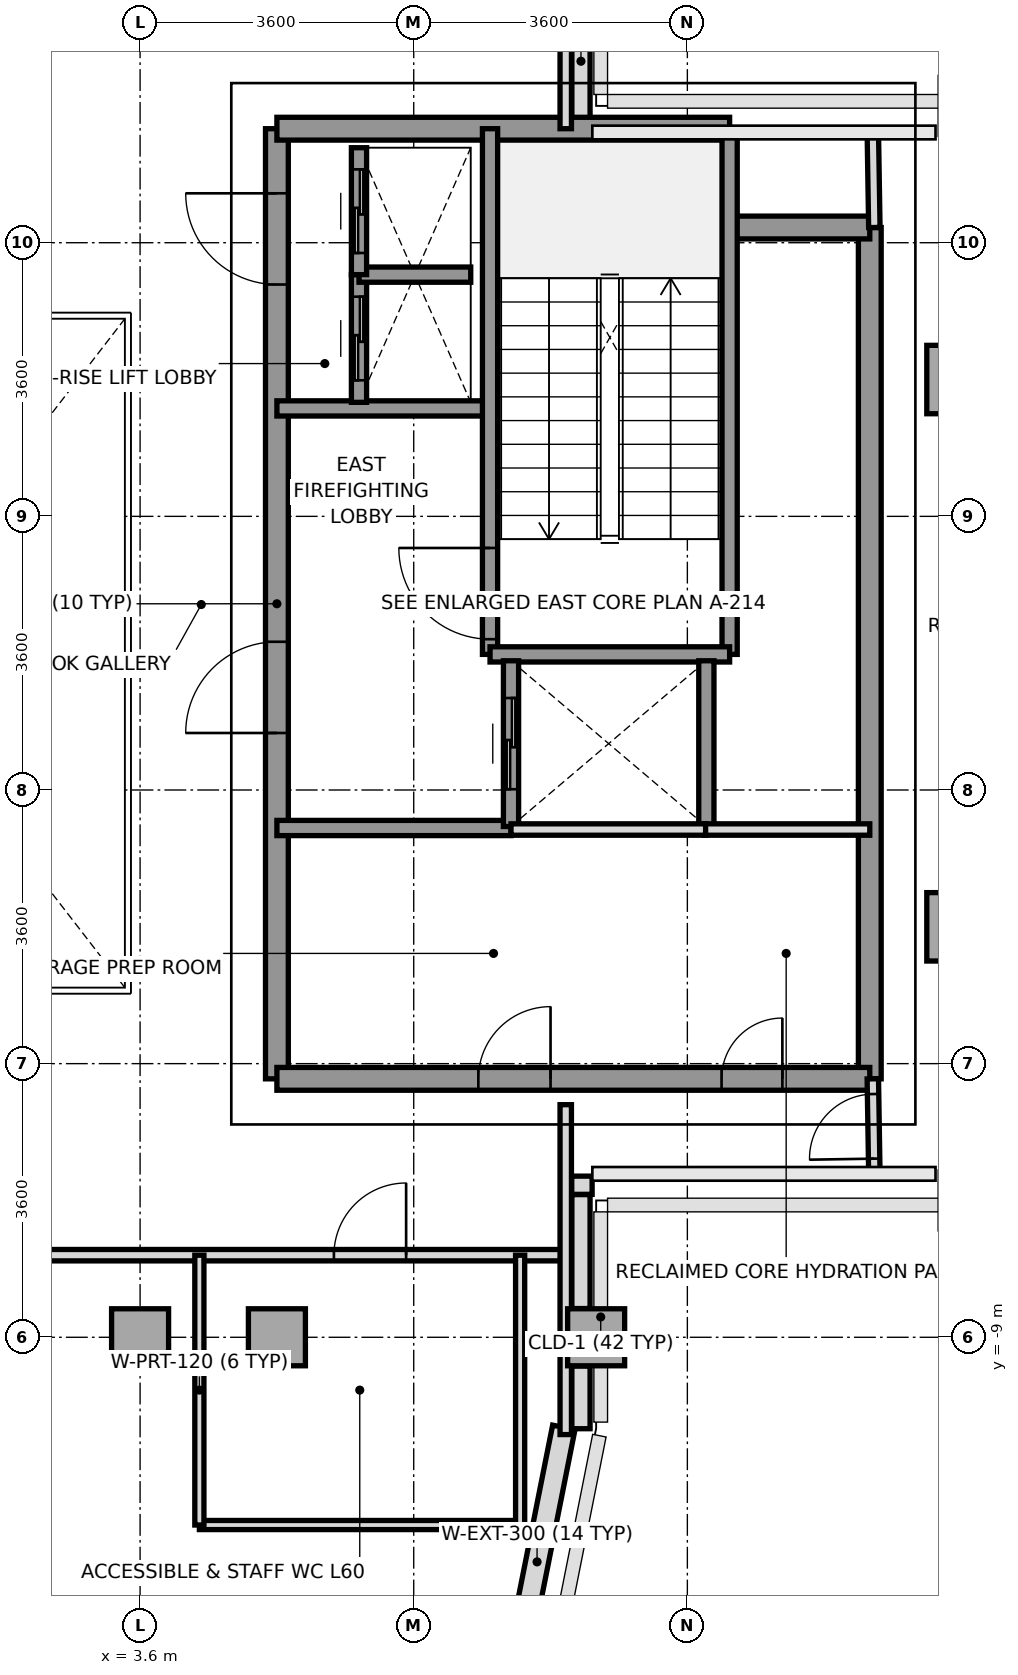
"""IFC4 building model, lengths in metres.
Left out: names, types, materials, properties, quantities, classifications, styles, units other than length and angle.
Written with IfcOpenShell. Run it as: python <this file> out.ifc"""

import sys

from ifc_helpers import new_model, si_unit, direction, frame, frame_2d, origin, origin_2d, place, context, subcontext, project, spatial, rectangle, extrude, source, transform, mapped, element, fill, save


model = new_model("IFC4")
c1 = context("Model", 3, precision=1e-05, world=origin(), true_north=direction((0.0, 1.0)))
c2 = subcontext(c1, "Body", "Model", "MODEL_VIEW")
j1 = project(units=[si_unit("LENGTHUNIT", "METRE"), si_unit("PLANEANGLEUNIT", "RADIAN")], contexts=[c1])
p1 = place(None, origin())
s1 = spatial("IfcSite", under=j1, at=p1, CompositionType="ELEMENT")
p2 = place(p1, origin())
s2 = spatial("IfcBuilding", under=s1, at=p2, CompositionType="ELEMENT")
p3 = place(p2, frame((0.0, 0.0, 219.4)))
s3 = spatial("IfcBuildingStorey", under=s2, at=p3, CompositionType="ELEMENT", Elevation=219.4)
m1 = source(origin(), c2, "Body", "SweptSolid", [
    extrude(rectangle(XDim=0.75, YDim=0.75, at=origin_2d()), origin(), (0.0, 0.0, 1.0), 4.01),
])
for number, where, z_axis, x_axis in (
    (1, (3.6, -9.0, 0.0), (0.0, 0.0, 1.0), (1.0, 0.0, 0.0)),
    (2, (5.4, -9.0, 0.0), (0.0, 0.0, 1.0), (1.0, 0.0, 0.0)),
    (3, (9.6, -9.0, 0.0), (0.0, 0.0, 1.0), (1.0, 0.0, 0.0)),
):
    element("IfcColumn", number, at=place(p3, frame(where, z_axis=z_axis, x_axis=x_axis)), inside=s3, PredefinedType="COLUMN", context=c2, shape_type="MappedRepresentation", body=[
        mapped(m1, transform((0.0, 0.0, 0.0), x_axis=(1.0, 0.0, 0.0), y_axis=(0.0, 1.0, 0.0), z_axis=(0.0, 0.0, 1.0), scale=1.0)),
    ])
m2 = source(origin(), c2, "Body", "SweptSolid", [
    extrude(rectangle(XDim=0.9, YDim=0.9, at=origin_2d()), origin(), (0.0, 0.0, 1.0), 4.01),
])
for number, where, z_axis, x_axis in (
    (4, (14.4, -3.6, 0.0), (0.0, 0.0, 1.0), (1.0, 0.0, 0.0)),
    (5, (14.4, 3.6, 0.0), (0.0, 0.0, 1.0), (1.0, 0.0, 0.0)),
):
    element("IfcColumn", number, at=place(p3, frame(where, z_axis=z_axis, x_axis=x_axis)), inside=s3, PredefinedType="COLUMN", context=c2, shape_type="MappedRepresentation", body=[
        mapped(m2, transform((0.0, 0.0, 0.0), x_axis=(1.0, 0.0, 0.0), y_axis=(0.0, 1.0, 0.0), z_axis=(0.0, 0.0, 1.0), scale=1.0)),
    ])
p4 = place(p3, frame((8.471, -13.725, 0.0), z_axis=(0.0, 0.0, 1.0), x_axis=(0.195114232679, 0.980780523974, 0.0)))
e6 = element("IfcWall", 6, at=p4, inside=s3, PredefinedType="SOLIDWALL", context=c2, shape_type="SweptSolid", body=[
    extrude(rectangle(XDim=3.609, YDim=0.3, at=frame_2d((1.804, 0.0))), origin(), (0.0, 0.0, 1.0), 4.01),
])
p5 = place(p3, frame((9.547, -7.0, 0.0), z_axis=(0.0, 0.0, 1.0), x_axis=(-1.0, 0.0, 0.0)))
e7 = element("IfcWall", 7, at=p5, inside=s3, PredefinedType="PARAPET", context=c2, shape_type="SweptSolid", body=[
    extrude(rectangle(XDim=0.269, YDim=0.24, at=frame_2d((0.135, 0.0))), origin(), (0.0, 0.0, 1.0), 1.15),
])
p6 = place(p3, frame((9.4, -7.123, 0.0), z_axis=(0.0, 0.0, 1.0), x_axis=(0.0, -1.0, 0.0)))
e8 = element("IfcWall", 8, at=p6, inside=s3, PredefinedType="PARAPET", context=c2, shape_type="SweptSolid", body=[
    extrude(rectangle(XDim=1.499, YDim=0.24, at=frame_2d((0.75, 0.0))), origin(), (0.0, 0.0, 1.0), 1.15),
])
p7 = place(p3, frame((9.4, -9.378, 0.0), z_axis=(0.0, 0.0, 1.0), x_axis=(0.0, -1.0, 0.0)))
e9 = element("IfcWall", 9, at=p7, inside=s3, PredefinedType="PARAPET", context=c2, shape_type="SweptSolid", body=[
    extrude(rectangle(XDim=0.825, YDim=0.24, at=frame_2d((0.413, 0.0))), origin(), (0.0, 0.0, 1.0), 1.15),
])
p8 = place(p3, frame((9.4, 8.622, 0.0), z_axis=(0.0, 0.0, 1.0), x_axis=(0.0, -1.0, 0.0)))
e10 = element("IfcWall", 10, at=p8, inside=s3, PredefinedType="PARAPET", context=c2, shape_type="SweptSolid", body=[
    extrude(rectangle(XDim=1.669, YDim=0.24, at=frame_2d((0.834, 0.0))), origin(), (0.0, 0.0, 1.0), 1.15),
])
p9 = place(p3, frame((13.2, -5.6, 0.0), z_axis=(0.0, 0.0, 1.0), x_axis=(0.0, 1.0, 0.0)))
e11 = element("IfcWall", 11, at=p9, inside=s3, PredefinedType="SHEAR", context=c2, shape_type="SweptSolid", body=[
    extrude(rectangle(XDim=11.2, YDim=0.3, at=frame_2d((5.6, 0.0))), origin(), (0.0, 0.0, 1.0), 4.01),
])
p10 = place(p3, frame((5.4, -5.6, 0.0), z_axis=(0.0, 0.0, 1.0), x_axis=(0.0, 1.0, 0.0)))
e12 = element("IfcWall", 12, at=p10, inside=s3, PredefinedType="SHEAR", context=c2, shape_type="SweptSolid", body=[
    extrude(rectangle(XDim=12.5, YDim=0.3, at=frame_2d((6.25, 0.0))), origin(), (0.0, 0.0, 1.0), 4.01),
])
p11 = place(p10, frame((4.55, 0.0, 0.0)))
e13 = element("IfcOpeningElement", 13, at=p11, cuts=e12, PredefinedType="OPENING", context=c2, shape_type="SweptSolid", body=[
    extrude(rectangle(XDim=1.2, YDim=2.2, at=frame_2d((0.6, 1.1))), frame((0.0, 0.16, 0.0), z_axis=(0.0, -1.0, 0.0), x_axis=(1.0, 0.0, 0.0)), (0.0, 0.0, 1.0), 0.32),
])
p12 = place(p10, frame((10.45, 0.0, 0.0)))
e14 = element("IfcOpeningElement", 14, at=p12, cuts=e12, PredefinedType="OPENING", context=c2, shape_type="SweptSolid", body=[
    extrude(rectangle(XDim=1.2, YDim=2.2, at=frame_2d((0.6, 1.1))), frame((0.0, 0.16, 0.0), z_axis=(0.0, -1.0, 0.0), x_axis=(1.0, 0.0, 0.0)), (0.0, 0.0, 1.0), 0.32),
])
p13 = place(p3, frame((5.4, 6.9, 0.0), z_axis=(0.0, 0.0, 1.0), x_axis=(1.0, 0.0, 0.0)))
e15 = element("IfcWall", 15, at=p13, inside=s3, PredefinedType="SHEAR", context=c2, shape_type="SweptSolid", body=[
    extrude(rectangle(XDim=5.956, YDim=0.3, at=frame_2d((2.978, 0.0))), origin(), (0.0, 0.0, 1.0), 4.01),
])
p14 = place(p3, frame((11.356, 5.6, 0.0), z_axis=(0.0, 0.0, 1.0), x_axis=(1.0, 0.0, 0.0)))
e16 = element("IfcWall", 16, at=p14, inside=s3, PredefinedType="SHEAR", context=c2, shape_type="SweptSolid", body=[
    extrude(rectangle(XDim=1.844, YDim=0.3, at=frame_2d((0.922, 0.0))), origin(), (0.0, 0.0, 1.0), 4.01),
])
p15 = place(p3, frame((5.4, -5.6, 0.0), z_axis=(0.0, 0.0, 1.0), x_axis=(1.0, 0.0, 0.0)))
e17 = element("IfcWall", 17, at=p15, inside=s3, PredefinedType="SHEAR", context=c2, shape_type="SweptSolid", body=[
    extrude(rectangle(XDim=7.8, YDim=0.3, at=frame_2d((3.9, 0.0))), origin(), (0.0, 0.0, 1.0), 4.01),
])
p16 = place(p15, frame((5.85, 0.0, 0.0)))
e18 = element("IfcOpeningElement", 18, at=p16, cuts=e17, PredefinedType="OPENING", context=c2, shape_type="SweptSolid", body=[
    extrude(rectangle(XDim=0.8, YDim=2.1, at=frame_2d((0.4, 1.05))), frame((0.0, 0.16, 0.0), z_axis=(0.0, -1.0, 0.0), x_axis=(1.0, 0.0, 0.0)), (0.0, 0.0, 1.0), 0.32),
])
p17 = place(p15, frame((2.65, 0.0, 0.0)))
e19 = element("IfcOpeningElement", 19, at=p17, cuts=e17, PredefinedType="OPENING", context=c2, shape_type="SweptSolid", body=[
    extrude(rectangle(XDim=0.95, YDim=2.15, at=frame_2d((0.475, 1.075))), frame((0.0, 0.16, 0.0), z_axis=(0.0, -1.0, 0.0), x_axis=(1.0, 0.0, 0.0)), (0.0, 0.0, 1.0), 0.32),
])
p18 = place(p3, frame((5.4, 3.22, 0.0), z_axis=(0.0, 0.0, 1.0), x_axis=(1.0, 0.0, 0.0)))
e20 = element("IfcWall", 20, at=p18, inside=s3, PredefinedType="SOLIDWALL", context=c2, shape_type="SweptSolid", body=[
    extrude(rectangle(XDim=2.78, YDim=0.2, at=frame_2d((1.39, 0.0))), origin(), (0.0, 0.0, 1.0), 4.01),
])
p19 = place(p3, frame((5.4, -2.3, 0.0), z_axis=(0.0, 0.0, 1.0), x_axis=(1.0, 0.0, 0.0)))
e21 = element("IfcWall", 21, at=p19, inside=s3, PredefinedType="SOLIDWALL", context=c2, shape_type="SweptSolid", body=[
    extrude(rectangle(XDim=3.08, YDim=0.2, at=frame_2d((1.54, 0.0))), origin(), (0.0, 0.0, 1.0), 4.01),
])
p20 = place(p3, frame((8.204, -0.016, 0.0), z_axis=(0.0, 0.0, 1.0), x_axis=(0.0, 1.0, 0.0)))
e22 = element("IfcWall", 22, at=p20, inside=s3, PredefinedType="SOLIDWALL", context=c2, shape_type="SweptSolid", body=[
    extrude(rectangle(XDim=6.916, YDim=0.2, at=frame_2d((3.458, 0.0))), origin(), (0.0, 0.0, 1.0), 4.01),
])
p21 = place(p20, frame((0.2, 0.0, 0.0)))
e23 = element("IfcOpeningElement", 23, at=p21, cuts=e22, PredefinedType="OPENING", context=c2, shape_type="SweptSolid", body=[
    extrude(rectangle(XDim=1.2, YDim=2.2, at=frame_2d((0.6, 1.1))), frame((0.0, 0.11, 0.0), z_axis=(0.0, -1.0, 0.0), x_axis=(1.0, 0.0, 0.0)), (0.0, 0.0, 1.0), 0.22),
])
p22 = place(p3, frame((11.356, -0.016, 0.0), z_axis=(0.0, 0.0, 1.0), x_axis=(0.0, 1.0, 0.0)))
e24 = element("IfcWall", 24, at=p22, inside=s3, PredefinedType="SOLIDWALL", context=c2, shape_type="SweptSolid", body=[
    extrude(rectangle(XDim=6.916, YDim=0.2, at=frame_2d((3.458, 0.0))), origin(), (0.0, 0.0, 1.0), 4.01),
])
p23 = place(p3, frame((8.204, -0.016, 0.0), z_axis=(0.0, 0.0, 1.0), x_axis=(1.0, 0.0, 0.0)))
e25 = element("IfcWall", 25, at=p23, inside=s3, PredefinedType="SOLIDWALL", context=c2, shape_type="SweptSolid", body=[
    extrude(rectangle(XDim=3.152, YDim=0.2, at=frame_2d((1.576, 0.0))), origin(), (0.0, 0.0, 1.0), 4.01),
])
p24 = place(p3, frame((8.48, -2.28, 0.0), z_axis=(0.0, 0.0, 1.0), x_axis=(0.0, 1.0, 0.0)))
e26 = element("IfcWall", 26, at=p24, inside=s3, PredefinedType="SOLIDWALL", context=c2, shape_type="SweptSolid", body=[
    extrude(rectangle(XDim=2.18, YDim=0.2, at=frame_2d((1.09, 0.0))), origin(), (0.0, 0.0, 1.0), 4.01),
])
p25 = place(p24, frame((0.49, 0.0, 0.0)))
e27 = element("IfcOpeningElement", 27, at=p25, cuts=e26, PredefinedType="OPENING", context=c2, shape_type="SweptSolid", body=[
    extrude(rectangle(XDim=1.2, YDim=2.2, at=frame_2d((0.6, 1.1))), frame((0.0, 0.11, 0.0), z_axis=(0.0, -1.0, 0.0), x_axis=(1.0, 0.0, 0.0)), (0.0, 0.0, 1.0), 0.22),
])
p26 = place(p3, frame((11.05, -2.28, 0.0), z_axis=(0.0, 0.0, 1.0), x_axis=(0.0, 1.0, 0.0)))
e28 = element("IfcWall", 28, at=p26, inside=s3, PredefinedType="SOLIDWALL", context=c2, shape_type="SweptSolid", body=[
    extrude(rectangle(XDim=2.18, YDim=0.2, at=frame_2d((1.09, 0.0))), origin(), (0.0, 0.0, 1.0), 4.01),
])
p27 = place(p3, frame((6.48, 3.3, 0.0), z_axis=(0.0, 0.0, 1.0), x_axis=(0.0, 1.0, 0.0)))
e29 = element("IfcWall", 29, at=p27, inside=s3, PredefinedType="SOLIDWALL", context=c2, shape_type="SweptSolid", body=[
    extrude(rectangle(XDim=1.68, YDim=0.2, at=frame_2d((0.84, 0.0))), origin(), (0.0, 0.0, 1.0), 4.01),
])
p28 = place(p27, frame((0.29, 0.0, 0.0)))
e30 = element("IfcOpeningElement", 30, at=p28, cuts=e29, PredefinedType="OPENING", context=c2, shape_type="SweptSolid", body=[
    extrude(rectangle(XDim=1.1, YDim=2.2, at=frame_2d((0.55, 1.1))), frame((0.0, 0.11, 0.0), z_axis=(0.0, -1.0, 0.0), x_axis=(1.0, 0.0, 0.0)), (0.0, 0.0, 1.0), 0.22),
])
p29 = place(p3, frame((6.48, 4.98, 0.0), z_axis=(0.0, 0.0, 1.0), x_axis=(1.0, 0.0, 0.0)))
e31 = element("IfcWall", 31, at=p29, inside=s3, PredefinedType="SOLIDWALL", context=c2, shape_type="SweptSolid", body=[
    extrude(rectangle(XDim=1.47, YDim=0.2, at=frame_2d((0.735, 0.0))), origin(), (0.0, 0.0, 1.0), 4.01),
])
p30 = place(p3, frame((6.48, 4.98, 0.0), z_axis=(0.0, 0.0, 1.0), x_axis=(0.0, 1.0, 0.0)))
e32 = element("IfcWall", 32, at=p30, inside=s3, PredefinedType="SOLIDWALL", context=c2, shape_type="SweptSolid", body=[
    extrude(rectangle(XDim=1.67, YDim=0.2, at=frame_2d((0.835, 0.0))), origin(), (0.0, 0.0, 1.0), 4.01),
])
p31 = place(p30, frame((0.285, 0.0, 0.0)))
e33 = element("IfcOpeningElement", 33, at=p31, cuts=e32, PredefinedType="OPENING", context=c2, shape_type="SweptSolid", body=[
    extrude(rectangle(XDim=1.1, YDim=2.2, at=frame_2d((0.55, 1.1))), frame((0.0, 0.11, 0.0), z_axis=(0.0, -1.0, 0.0), x_axis=(1.0, 0.0, 0.0)), (0.0, 0.0, 1.0), 0.22),
])
p32 = place(p3, frame((11.02, -2.32, 0.0), z_axis=(0.0, 0.0, 1.0), x_axis=(1.0, 0.0, 0.0)))
e34 = element("IfcWall", 34, at=p32, inside=s3, PredefinedType="PARTITIONING", context=c2, shape_type="SweptSolid", body=[
    extrude(rectangle(XDim=2.18, YDim=0.15, at=frame_2d((1.09, 0.0))), origin(), (0.0, 0.0, 1.0), 4.01),
])
p33 = place(p3, frame((8.48, -2.32, 0.0), z_axis=(0.0, 0.0, 1.0), x_axis=(1.0, 0.0, 0.0)))
e35 = element("IfcWall", 35, at=p33, inside=s3, PredefinedType="PARTITIONING", context=c2, shape_type="SweptSolid", body=[
    extrude(rectangle(XDim=2.56, YDim=0.15, at=frame_2d((1.28, 0.0))), origin(), (0.0, 0.0, 1.0), 4.01),
])
p34 = place(p3, frame((9.2, 6.9, 0.0), z_axis=(0.0, 0.0, 1.0), x_axis=(0.0, 1.0, 0.0)))
e36 = element("IfcWall", 36, at=p34, inside=s3, PredefinedType="PARTITIONING", context=c2, shape_type="SweptSolid", body=[
    extrude(rectangle(XDim=3.38, YDim=0.15, at=frame_2d((1.69, 0.0))), origin(), (0.0, 0.0, 1.0), 3.61),
])
p35 = place(p3, frame((-9.2, -7.92, 0.0), z_axis=(0.0, 0.0, 1.0), x_axis=(1.0, 0.0, 0.0)))
e37 = element("IfcWall", 37, at=p35, inside=s3, PredefinedType="PARTITIONING", context=c2, shape_type="SweptSolid", body=[
    extrude(rectangle(XDim=18.4, YDim=0.15, at=frame_2d((9.2, 0.0))), origin(), (0.0, 0.0, 1.0), 3.57),
])
p36 = place(p35, frame((15.35, 0.0, 0.0)))
e38 = element("IfcOpeningElement", 38, at=p36, cuts=e37, PredefinedType="OPENING", context=c2, shape_type="SweptSolid", body=[
    extrude(rectangle(XDim=0.95, YDim=2.15, at=frame_2d((0.475, 1.075))), frame((0.0, 0.085, 0.0), z_axis=(0.0, -1.0, 0.0), x_axis=(1.0, 0.0, 0.0)), (0.0, 0.0, 1.0), 0.17),
])
p37 = place(p35, frame((6.7, 0.0, 0.0)))
e39 = element("IfcOpeningElement", 39, at=p37, cuts=e37, PredefinedType="OPENING", context=c2, shape_type="SweptSolid", body=[
    extrude(rectangle(XDim=1.1, YDim=2.2, at=frame_2d((0.55, 1.1))), frame((0.0, 0.085, 0.0), z_axis=(0.0, -1.0, 0.0), x_axis=(1.0, 0.0, 0.0)), (0.0, 0.0, 1.0), 0.17),
])
p38 = place(p3, frame((9.2, -10.28, 0.0), z_axis=(0.0, 0.0, 1.0), x_axis=(0.0, 1.0, 0.0)))
e40 = element("IfcWall", 40, at=p38, inside=s3, PredefinedType="PARTITIONING", context=c2, shape_type="SweptSolid", body=[
    extrude(rectangle(XDim=4.34, YDim=0.15, at=frame_2d((2.17, 0.0))), origin(), (0.0, 0.0, 1.0), 3.61),
])
p39 = place(p3, frame((4.38, -11.47, 0.0), z_axis=(0.0, 0.0, 1.0), x_axis=(1.0, 0.0, 0.0)))
e41 = element("IfcWall", 41, at=p39, inside=s3, PredefinedType="PARTITIONING", context=c2, shape_type="SweptSolid", body=[
    extrude(rectangle(XDim=4.22, YDim=0.12, at=frame_2d((2.11, 0.0))), origin(), (0.0, 0.0, 1.0), 4.01),
])
for number, where, z_axis, x_axis in (
    (42, (4.38, -11.47, 0.0), (0.0, 0.0, 1.0), (0.0, 1.0, 0.0)),
    (43, (8.6, -11.47, 0.0), (0.0, 0.0, 1.0), (0.0, 1.0, 0.0)),
):
    element("IfcWall", number, at=place(p3, frame(where, z_axis=z_axis, x_axis=x_axis)), inside=s3, PredefinedType="PARTITIONING", context=c2, shape_type="SweptSolid", body=[
        extrude(rectangle(XDim=3.55, YDim=0.12, at=frame_2d((1.775, 0.0))), origin(), (0.0, 0.0, 1.0), 3.61),
    ])
p40 = place(p3, frame((13.26, 5.6, 0.0), z_axis=(0.0, 0.0, 1.0), x_axis=(-0.016013571389, 0.999871774545, 0.0)))
e44 = element("IfcWall", 44, at=p40, inside=s3, PredefinedType="PARTITIONING", context=c2, shape_type="SweptSolid", body=[
    extrude(rectangle(XDim=1.25, YDim=0.15, at=frame_2d((0.625, 0.0))), origin(), (0.0, 0.0, 1.0), 4.01),
])
p41 = place(p3, frame((13.26, -6.85, 0.0), z_axis=(0.0, 0.0, 1.0), x_axis=(-0.016013571389, 0.999871774545, 0.0)))
e45 = element("IfcWall", 45, at=p41, inside=s3, PredefinedType="PARTITIONING", context=c2, shape_type="SweptSolid", body=[
    extrude(rectangle(XDim=1.25, YDim=0.15, at=frame_2d((0.625, 0.0))), origin(), (0.0, 0.0, 1.0), 4.01),
])
p42 = place(p41, frame((0.2, 0.0, 0.0)))
e46 = element("IfcOpeningElement", 46, at=p42, cuts=e45, PredefinedType="OPENING", context=c2, shape_type="SweptSolid", body=[
    extrude(rectangle(XDim=0.85, YDim=2.1, at=frame_2d((0.425, 1.05))), frame((0.0, 0.085, 0.0), z_axis=(0.0, -1.0, 0.0), x_axis=(1.0, 0.0, 0.0)), (0.0, 0.0, 1.0), 0.17),
])
m3 = source(origin(), c2, "Body", "SweptSolid", [
    extrude(rectangle(XDim=1.2, YDim=2.2, at=frame_2d((0.6, 1.1))), frame((0.0, 0.025, 0.0), z_axis=(0.0, -1.0, 0.0), x_axis=(1.0, 0.0, 0.0)), (0.0, 0.0, 1.0), 0.05),
])
p43 = place(p21, origin())
e47 = element("IfcDoor", 47, at=p43, inside=s3, OperationType="SINGLE_SWING_RIGHT", PredefinedType="DOOR", context=c2, shape_type="MappedRepresentation", body=[
    mapped(m3, transform((0.0, 0.0, 0.0), x_axis=(1.0, 0.0, 0.0), y_axis=(0.0, 1.0, 0.0), z_axis=(0.0, 0.0, 1.0), scale=1.0)),
])
fill(e23, e47)
p44 = place(p11, origin())
e48 = element("IfcDoor", 48, at=p44, inside=s3, OperationType="SINGLE_SWING_LEFT", PredefinedType="DOOR", context=c2, shape_type="MappedRepresentation", body=[
    mapped(m3, transform((0.0, 0.0, 0.0), x_axis=(1.0, 0.0, 0.0), y_axis=(0.0, 1.0, 0.0), z_axis=(0.0, 0.0, 1.0), scale=1.0)),
])
fill(e13, e48)
p45 = place(p12, origin())
e49 = element("IfcDoor", 49, at=p45, inside=s3, OperationType="SINGLE_SWING_RIGHT", PredefinedType="DOOR", context=c2, shape_type="MappedRepresentation", body=[
    mapped(m3, transform((0.0, 0.0, 0.0), x_axis=(1.0, 0.0, 0.0), y_axis=(0.0, 1.0, 0.0), z_axis=(0.0, 0.0, 1.0), scale=1.0)),
])
fill(e14, e49)
m4 = source(origin(), c2, "Body", "SweptSolid", [
    extrude(rectangle(XDim=0.8, YDim=2.1, at=frame_2d((0.4, 1.05))), frame((0.0, 0.025, 0.0), z_axis=(0.0, -1.0, 0.0), x_axis=(1.0, 0.0, 0.0)), (0.0, 0.0, 1.0), 0.05),
])
p46 = place(p16, origin())
e50 = element("IfcDoor", 50, at=p46, inside=s3, OperationType="SINGLE_SWING_RIGHT", PredefinedType="DOOR", context=c2, shape_type="MappedRepresentation", body=[
    mapped(m4, transform((0.0, 0.0, 0.0), x_axis=(1.0, 0.0, 0.0), y_axis=(0.0, 1.0, 0.0), z_axis=(0.0, 0.0, 1.0), scale=1.0)),
])
fill(e18, e50)
m5 = source(origin(), c2, "Body", "SweptSolid", [
    extrude(rectangle(XDim=0.95, YDim=2.15, at=frame_2d((0.475, 1.075))), frame((0.0, 0.025, 0.0), z_axis=(0.0, -1.0, 0.0), x_axis=(1.0, 0.0, 0.0)), (0.0, 0.0, 1.0), 0.05),
])
p47 = place(p17, origin())
e51 = element("IfcDoor", 51, at=p47, inside=s3, OperationType="SINGLE_SWING_RIGHT", PredefinedType="DOOR", context=c2, shape_type="MappedRepresentation", body=[
    mapped(m5, transform((0.0, 0.0, 0.0), x_axis=(1.0, 0.0, 0.0), y_axis=(0.0, 1.0, 0.0), z_axis=(0.0, 0.0, 1.0), scale=1.0)),
])
fill(e19, e51)
p48 = place(p25, origin())
e52 = element("IfcDoor", 52, at=p48, inside=s3, OperationType="SLIDING_TO_RIGHT", PredefinedType="DOOR", context=c2, shape_type="MappedRepresentation", body=[
    mapped(m3, transform((0.0, 0.0, 0.0), x_axis=(1.0, 0.0, 0.0), y_axis=(0.0, 1.0, 0.0), z_axis=(0.0, 0.0, 1.0), scale=1.0)),
])
fill(e27, e52)
m6 = source(origin(), c2, "Body", "SweptSolid", [
    extrude(rectangle(XDim=1.1, YDim=2.2, at=frame_2d((0.55, 1.1))), frame((0.0, 0.025, 0.0), z_axis=(0.0, -1.0, 0.0), x_axis=(1.0, 0.0, 0.0)), (0.0, 0.0, 1.0), 0.05),
])
p49 = place(p28, origin())
e53 = element("IfcDoor", 53, at=p49, inside=s3, OperationType="SLIDING_TO_LEFT", PredefinedType="DOOR", context=c2, shape_type="MappedRepresentation", body=[
    mapped(m6, transform((0.0, 0.0, 0.0), x_axis=(1.0, 0.0, 0.0), y_axis=(0.0, 1.0, 0.0), z_axis=(0.0, 0.0, 1.0), scale=1.0)),
])
fill(e30, e53)
p50 = place(p31, origin())
e54 = element("IfcDoor", 54, at=p50, inside=s3, OperationType="SLIDING_TO_LEFT", PredefinedType="DOOR", context=c2, shape_type="MappedRepresentation", body=[
    mapped(m6, transform((0.0, 0.0, 0.0), x_axis=(1.0, 0.0, 0.0), y_axis=(0.0, 1.0, 0.0), z_axis=(0.0, 0.0, 1.0), scale=1.0)),
])
fill(e33, e54)
p51 = place(p36, origin())
e55 = element("IfcDoor", 55, at=p51, inside=s3, OperationType="SINGLE_SWING_RIGHT", PredefinedType="DOOR", context=c2, shape_type="MappedRepresentation", body=[
    mapped(m5, transform((0.0, 0.0, 0.0), x_axis=(1.0, 0.0, 0.0), y_axis=(0.0, 1.0, 0.0), z_axis=(0.0, 0.0, 1.0), scale=1.0)),
])
fill(e38, e55)
m7 = source(origin(), c2, "Body", "SweptSolid", [
    extrude(rectangle(XDim=0.85, YDim=2.1, at=frame_2d((0.425, 1.05))), frame((0.0, 0.025, 0.0), z_axis=(0.0, -1.0, 0.0), x_axis=(1.0, 0.0, 0.0)), (0.0, 0.0, 1.0), 0.05),
])
p52 = place(p42, origin())
e56 = element("IfcDoor", 56, at=p52, inside=s3, OperationType="SINGLE_SWING_LEFT", PredefinedType="DOOR", context=c2, shape_type="MappedRepresentation", body=[
    mapped(m7, transform((0.0, 0.0, 0.0), x_axis=(1.0, 0.0, 0.0), y_axis=(0.0, 1.0, 0.0), z_axis=(0.0, 0.0, 1.0), scale=1.0)),
])
fill(e46, e56)
save(model, sys.argv[1])
